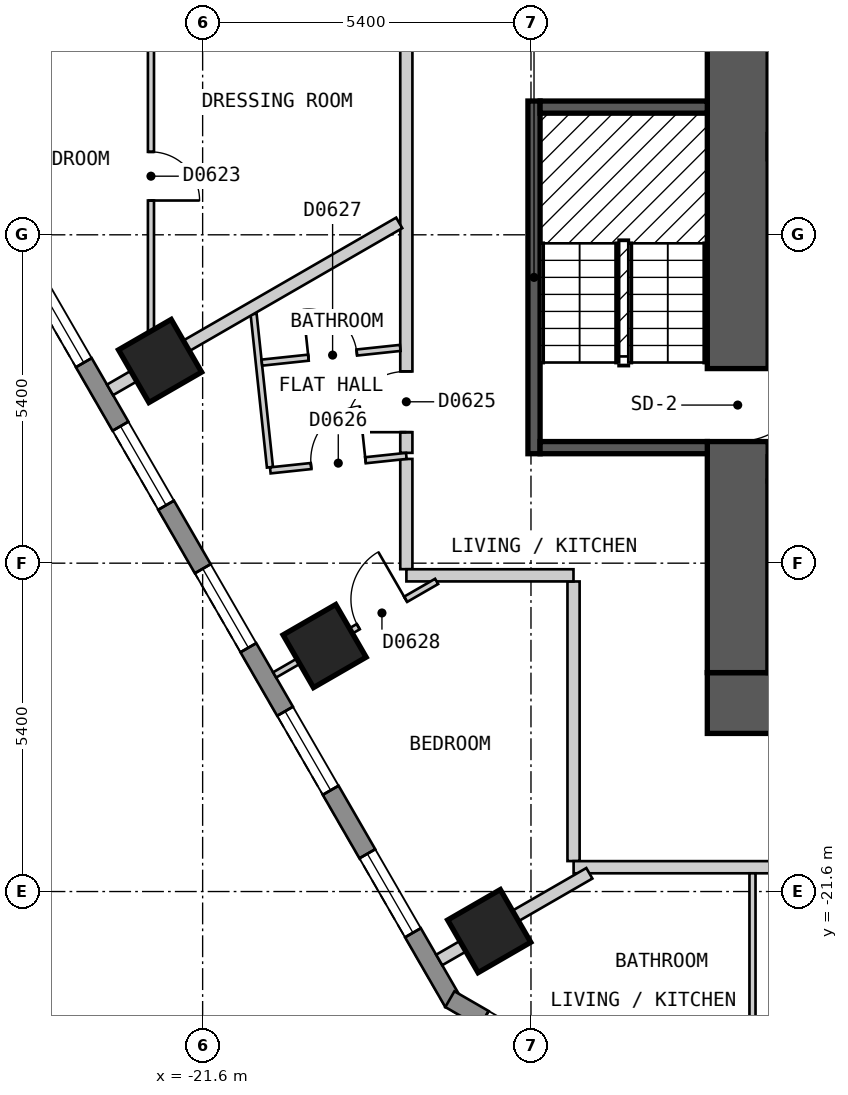
"""IFC4 building model, lengths in metres.
Left out: names, types, materials, properties, quantities, classifications, styles, units other than length and angle.
Written with IfcOpenShell. Run it as: python <this file> out.ifc"""

import sys

from ifc_helpers import new_model, si_unit, direction, frame, frame_2d, origin, origin_2d, place, context, subcontext, project, spatial, polyline, rectangle, outline, extrude, element, fill, save


model = new_model("IFC4")
c1 = context("Model", 3, precision=1e-05, world=origin(), true_north=direction((0.0, 1.0)))
c2 = subcontext(c1, "Body", "Model", "MODEL_VIEW")
j1 = project(units=[si_unit("LENGTHUNIT", "METRE"), si_unit("PLANEANGLEUNIT", "RADIAN")], contexts=[c1])
p1 = place(None, origin())
s1 = spatial("IfcSite", under=j1, at=p1, CompositionType="ELEMENT")
p2 = place(p1, origin())
s2 = spatial("IfcBuilding", under=s1, at=p2, CompositionType="ELEMENT")
p3 = place(p2, frame((0.0, 0.0, 81.0)))
s3 = spatial("IfcBuildingStorey", under=s2, at=p3, CompositionType="ELEMENT", Elevation=81.0)
for number, where, z_axis, x_axis in (
    (1, (-22.3, -12.875, 0.0), (0.0, 0.0, 1.0), (0.5, -0.866, 0.0)),
    (2, (-19.594, -17.563, 0.0), (0.0, 0.0, 1.0), (0.5, -0.866, 0.0)),
    (3, (-16.887, -22.251, 0.0), (0.0, 0.0, 1.0), (0.5, -0.866, 0.0)),
):
    element("IfcColumn", number, at=place(p3, frame(where, z_axis=z_axis, x_axis=x_axis)), inside=s3, PredefinedType="COLUMN", context=c2, shape_type="SweptSolid", body=[
        extrude(rectangle(XDim=1.0, YDim=1.0, at=origin_2d()), origin(), (0.0, 0.0, 1.0), 3.0),
    ])
p4 = place(p3, frame((-13.3, -18.5, 0.0), z_axis=(0.0, 0.0, 1.0), x_axis=(1.0, 0.0, 0.0)))
e4 = element("IfcWall", 4, at=p4, inside=s3, PredefinedType="SHEAR", context=c2, shape_type="SweptSolid", body=[
    extrude(rectangle(XDim=26.6, YDim=1.0, at=frame_2d((13.3, 0.0))), origin(), (0.0, 0.0, 1.0), 2.7),
])
p5 = place(p3, frame((-12.8, -18.0, 0.0), z_axis=(0.0, 0.0, 1.0), x_axis=(0.0, 1.0, 0.0)))
e5 = element("IfcWall", 5, at=p5, inside=s3, PredefinedType="SHEAR", context=c2, shape_type="SweptSolid", body=[
    extrude(rectangle(XDim=12.0, YDim=1.0, at=frame_2d((6.0, 0.0))), origin(), (0.0, 0.0, 1.0), 2.7),
])
p6 = place(p5, frame((3.8, 0.0, 0.0)))
e6 = element("IfcOpeningElement", 6, at=p6, cuts=e5, PredefinedType="OPENING", context=c2, shape_type="SweptSolid", body=[
    extrude(rectangle(XDim=1.2, YDim=2.1, at=frame_2d((0.6, 1.05))), frame((0.0, 0.51, 0.0), z_axis=(0.0, -1.0, 0.0), x_axis=(1.0, 0.0, 0.0)), (0.0, 0.0, 1.0), 1.02),
])
p7 = place(p3, frame((-29.027, -3.425, 0.0), z_axis=(0.0, 0.0, 1.0), x_axis=(0.500035407905, -0.866004960056, 0.0)))
e7 = element("IfcWall", 7, at=p7, inside=s3, PredefinedType="SOLIDWALL", context=c2, shape_type="SweptSolid", body=[
    extrude(outline(polyline([(0.0, -0.15), (23.094, -0.15), (23.014, 0.15), (0.08, 0.15), (0.0, -0.15)])), origin(), (0.0, 0.0, 1.0), 2.7),
])
p8 = place(p7, frame((1.324, 0.0, 0.15)))
e8 = element("IfcOpeningElement", 8, at=p8, cuts=e7, PredefinedType="OPENING", context=c2, shape_type="SweptSolid", body=[
    extrude(rectangle(XDim=1.5, YDim=2.1, at=frame_2d((0.75, 1.05))), frame((0.0, 0.16, 0.0), z_axis=(0.0, -1.0, 0.0), x_axis=(1.0, 0.0, 0.0)), (0.0, 0.0, 1.0), 0.32),
])
p9 = place(p7, frame((4.031, 0.0, 0.15)))
e9 = element("IfcOpeningElement", 9, at=p9, cuts=e7, PredefinedType="OPENING", context=c2, shape_type="SweptSolid", body=[
    extrude(rectangle(XDim=1.5, YDim=2.1, at=frame_2d((0.75, 1.05))), frame((0.0, 0.16, 0.0), z_axis=(0.0, -1.0, 0.0), x_axis=(1.0, 0.0, 0.0)), (0.0, 0.0, 1.0), 0.32),
])
p10 = place(p7, frame((6.737, 0.0, 0.15)))
e10 = element("IfcOpeningElement", 10, at=p10, cuts=e7, PredefinedType="OPENING", context=c2, shape_type="SweptSolid", body=[
    extrude(rectangle(XDim=1.5, YDim=2.1, at=frame_2d((0.75, 1.05))), frame((0.0, 0.16, 0.0), z_axis=(0.0, -1.0, 0.0), x_axis=(1.0, 0.0, 0.0)), (0.0, 0.0, 1.0), 0.32),
])
p11 = place(p7, frame((9.444, 0.0, 0.15)))
e11 = element("IfcOpeningElement", 11, at=p11, cuts=e7, PredefinedType="OPENING", context=c2, shape_type="SweptSolid", body=[
    extrude(rectangle(XDim=1.5, YDim=2.1, at=frame_2d((0.75, 1.05))), frame((0.0, 0.16, 0.0), z_axis=(0.0, -1.0, 0.0), x_axis=(1.0, 0.0, 0.0)), (0.0, 0.0, 1.0), 0.32),
])
p12 = place(p7, frame((12.151, 0.0, 0.15)))
e12 = element("IfcOpeningElement", 12, at=p12, cuts=e7, PredefinedType="OPENING", context=c2, shape_type="SweptSolid", body=[
    extrude(rectangle(XDim=1.5, YDim=2.1, at=frame_2d((0.75, 1.05))), frame((0.0, 0.16, 0.0), z_axis=(0.0, -1.0, 0.0), x_axis=(1.0, 0.0, 0.0)), (0.0, 0.0, 1.0), 0.32),
])
p13 = place(p7, frame((14.857, 0.0, 0.15)))
e13 = element("IfcOpeningElement", 13, at=p13, cuts=e7, PredefinedType="OPENING", context=c2, shape_type="SweptSolid", body=[
    extrude(rectangle(XDim=1.5, YDim=2.1, at=frame_2d((0.75, 1.05))), frame((0.0, 0.16, 0.0), z_axis=(0.0, -1.0, 0.0), x_axis=(1.0, 0.0, 0.0)), (0.0, 0.0, 1.0), 0.32),
])
p14 = place(p7, frame((17.564, 0.0, 0.15)))
e14 = element("IfcOpeningElement", 14, at=p14, cuts=e7, PredefinedType="OPENING", context=c2, shape_type="SweptSolid", body=[
    extrude(rectangle(XDim=1.5, YDim=2.1, at=frame_2d((0.75, 1.05))), frame((0.0, 0.16, 0.0), z_axis=(0.0, -1.0, 0.0), x_axis=(1.0, 0.0, 0.0)), (0.0, 0.0, 1.0), 0.32),
])
p15 = place(p7, frame((20.27, 0.0, 0.15)))
e15 = element("IfcOpeningElement", 15, at=p15, cuts=e7, PredefinedType="OPENING", context=c2, shape_type="SweptSolid", body=[
    extrude(rectangle(XDim=1.5, YDim=2.1, at=frame_2d((0.75, 1.05))), frame((0.0, 0.16, 0.0), z_axis=(0.0, -1.0, 0.0), x_axis=(1.0, 0.0, 0.0)), (0.0, 0.0, 1.0), 0.32),
])
p16 = place(p3, frame((-17.534, -23.37, 0.0), z_axis=(0.0, 0.0, 1.0), x_axis=(0.866010750942, -0.50002537861, 0.0)))
e16 = element("IfcWall", 16, at=p16, inside=s3, PredefinedType="SOLIDWALL", context=c2, shape_type="SweptSolid", body=[
    extrude(outline(polyline([(0.0, -0.15), (5.0, -0.15), (4.919, 0.15), (0.08, 0.15), (0.0, -0.15)])), origin(), (0.0, 0.0, 1.0), 2.7),
])
p17 = place(p16, frame((0.65, 0.0, 0.15)))
e17 = element("IfcOpeningElement", 17, at=p17, cuts=e16, PredefinedType="OPENING", context=c2, shape_type="SweptSolid", body=[
    extrude(rectangle(XDim=1.2, YDim=2.1, at=frame_2d((0.6, 1.05))), frame((0.0, 0.16, 0.0), z_axis=(0.0, -1.0, 0.0), x_axis=(1.0, 0.0, 0.0)), (0.0, 0.0, 1.0), 0.32),
])
p18 = place(p16, frame((3.15, 0.0, 0.15)))
e18 = element("IfcOpeningElement", 18, at=p18, cuts=e16, PredefinedType="OPENING", context=c2, shape_type="SweptSolid", body=[
    extrude(rectangle(XDim=1.2, YDim=2.1, at=frame_2d((0.6, 1.05))), frame((0.0, 0.16, 0.0), z_axis=(0.0, -1.0, 0.0), x_axis=(1.0, 0.0, 0.0)), (0.0, 0.0, 1.0), 0.32),
])
p19 = place(p3, frame((-15.5, -16.501, 0.0), z_axis=(0.0, 0.0, 1.0), x_axis=(0.0, -1.0, 0.0)))
e19 = element("IfcWall", 19, at=p19, inside=s3, PredefinedType="PARTITIONING", context=c2, shape_type="SweptSolid", body=[
    extrude(rectangle(XDim=4.598, YDim=0.2, at=frame_2d((2.299, 0.0))), origin(), (0.0, 0.0, 1.0), 2.7),
])
p20 = place(p3, frame((-18.25, -14.486, 0.0), z_axis=(0.0, 0.0, 1.0), x_axis=(0.0, -1.0, 0.0)))
e20 = element("IfcWall", 20, at=p20, inside=s3, PredefinedType="PARTITIONING", context=c2, shape_type="SweptSolid", body=[
    extrude(rectangle(XDim=1.813, YDim=0.2, at=frame_2d((0.906, 0.0))), origin(), (0.0, 0.0, 1.0), 2.7),
])
p21 = place(p3, frame((-18.249, -16.4, 0.0), z_axis=(0.0, 0.0, 1.0), x_axis=(1.0, 0.0, 0.0)))
e21 = element("IfcWall", 21, at=p21, inside=s3, PredefinedType="PARTITIONING", context=c2, shape_type="SweptSolid", body=[
    extrude(rectangle(XDim=2.748, YDim=0.2, at=frame_2d((1.374, 0.0))), origin(), (0.0, 0.0, 1.0), 2.7),
])
p22 = place(p3, frame((-15.499, -21.2, 0.0), z_axis=(0.0, 0.0, 1.0), x_axis=(1.0, 0.0, 0.0)))
e22 = element("IfcWall", 22, at=p22, inside=s3, PredefinedType="PARTITIONING", context=c2, shape_type="SweptSolid", body=[
    extrude(rectangle(XDim=30.898, YDim=0.2, at=frame_2d((15.449, 0.0))), origin(), (0.0, 0.0, 1.0), 2.7),
])
p23 = place(p22, frame((4.954, 0.0, 0.0)))
e23 = element("IfcOpeningElement", 23, at=p23, cuts=e22, PredefinedType="OPENING", context=c2, shape_type="SweptSolid", body=[
    extrude(rectangle(XDim=1.0, YDim=2.1, at=frame_2d((0.5, 1.05))), frame((0.0, 0.11, 0.0), z_axis=(0.0, -1.0, 0.0), x_axis=(1.0, 0.0, 0.0)), (0.0, 0.0, 1.0), 0.22),
])
p24 = place(p22, frame((25.046, 0.0, 0.0)))
e24 = element("IfcOpeningElement", 24, at=p24, cuts=e22, PredefinedType="OPENING", context=c2, shape_type="SweptSolid", body=[
    extrude(rectangle(XDim=1.0, YDim=2.1, at=frame_2d((0.5, 1.05))), frame((0.0, 0.11, 0.0), z_axis=(0.0, -1.0, 0.0), x_axis=(1.0, 0.0, 0.0)), (0.0, 0.0, 1.0), 0.22),
])
p25 = place(p3, frame((-18.25, -14.386, 0.0), z_axis=(0.0, 0.0, 1.0), x_axis=(0.0, 1.0, 0.0)))
e25 = element("IfcWall", 25, at=p25, inside=s3, PredefinedType="PARTITIONING", context=c2, shape_type="SweptSolid", body=[
    extrude(rectangle(XDim=7.786, YDim=0.2, at=frame_2d((3.893, 0.0))), origin(), (0.0, 0.0, 1.0), 2.7),
])
p26 = place(p25, frame((0.34, 0.0, 0.0)))
e26 = element("IfcOpeningElement", 26, at=p26, cuts=e25, PredefinedType="OPENING", context=c2, shape_type="SweptSolid", body=[
    extrude(rectangle(XDim=1.0, YDim=2.1, at=frame_2d((0.5, 1.05))), frame((0.0, 0.11, 0.0), z_axis=(0.0, -1.0, 0.0), x_axis=(1.0, 0.0, 0.0)), (0.0, 0.0, 1.0), 0.22),
])
p27 = place(p3, frame((-20.762, -12.102, 0.0), z_axis=(0.0, 0.0, 1.0), x_axis=(0.106118300401, -0.994353511745, 0.0)))
e27 = element("IfcWall", 27, at=p27, inside=s3, PredefinedType="PARTITIONING", context=c2, shape_type="SweptSolid", body=[
    extrude(rectangle(XDim=2.535, YDim=0.1, at=frame_2d((1.268, 0.0))), origin(), (0.0, 0.0, 1.0), 2.7),
])
p28 = place(p3, frame((-12.557, -21.3, 0.0), z_axis=(0.0, 0.0, 1.0), x_axis=(0.0, -1.0, 0.0)))
e28 = element("IfcWall", 28, at=p28, inside=s3, PredefinedType="PARTITIONING", context=c2, shape_type="SweptSolid", body=[
    extrude(rectangle(XDim=2.909, YDim=0.1, at=frame_2d((1.455, 0.0))), origin(), (0.0, 0.0, 1.0), 2.7),
])
p29 = place(p3, frame((-20.626, -12.902, 0.0), z_axis=(0.0, 0.0, 1.0), x_axis=(0.994385570266, 0.105817473257, 0.0)))
e29 = element("IfcWall", 29, at=p29, inside=s3, PredefinedType="PARTITIONING", context=c2, shape_type="SweptSolid", body=[
    extrude(rectangle(XDim=2.289, YDim=0.1, at=frame_2d((1.145, 0.0))), origin(), (0.0, 0.0, 1.0), 2.7),
])
p30 = place(p29, frame((0.77, 0.0, 0.0)))
e30 = element("IfcOpeningElement", 30, at=p30, cuts=e29, PredefinedType="OPENING", context=c2, shape_type="SweptSolid", body=[
    extrude(rectangle(XDim=0.8, YDim=2.1, at=frame_2d((0.4, 1.05))), frame((0.0, 0.06, 0.0), z_axis=(0.0, -1.0, 0.0), x_axis=(1.0, 0.0, 0.0)), (0.0, 0.0, 1.0), 0.12),
])
p31 = place(p3, frame((-20.487, -14.674, 0.0), z_axis=(0.0, 0.0, 1.0), x_axis=(0.994386484046, 0.105808885948, 0.0)))
e31 = element("IfcWall", 31, at=p31, inside=s3, PredefinedType="PARTITIONING", context=c2, shape_type="SweptSolid", body=[
    extrude(rectangle(XDim=2.25, YDim=0.1, at=frame_2d((1.125, 0.0))), origin(), (0.0, 0.0, 1.0), 2.7),
])
p32 = place(p31, frame((0.674, 0.0, 0.0)))
e32 = element("IfcOpeningElement", 32, at=p32, cuts=e31, PredefinedType="OPENING", context=c2, shape_type="SweptSolid", body=[
    extrude(rectangle(XDim=0.9, YDim=2.1, at=frame_2d((0.45, 1.05))), frame((0.0, 0.06, 0.0), z_axis=(0.0, -1.0, 0.0), x_axis=(1.0, 0.0, 0.0)), (0.0, 0.0, 1.0), 0.12),
])
p33 = place(p3, frame((-22.45, -12.846, 0.0), z_axis=(0.0, 0.0, 1.0), x_axis=(0.0, 1.0, 0.0)))
e33 = element("IfcWall", 33, at=p33, inside=s3, PredefinedType="PARTITIONING", context=c2, shape_type="SweptSolid", body=[
    extrude(rectangle(XDim=6.078, YDim=0.1, at=frame_2d((3.039, 0.0))), origin(), (0.0, 0.0, 1.0), 2.7),
])
p34 = place(p33, frame((2.61, 0.0, 0.0)))
e34 = element("IfcOpeningElement", 34, at=p34, cuts=e33, PredefinedType="OPENING", context=c2, shape_type="SweptSolid", body=[
    extrude(rectangle(XDim=0.8, YDim=2.1, at=frame_2d((0.4, 1.05))), frame((0.0, 0.06, 0.0), z_axis=(0.0, -1.0, 0.0), x_axis=(1.0, 0.0, 0.0)), (0.0, 0.0, 1.0), 0.12),
])
p35 = place(p3, frame((-20.416, -18.038, 0.0), z_axis=(0.0, 0.0, 1.0), x_axis=(0.866026989333, 0.499997253739, 0.0)))
e35 = element("IfcWall", 35, at=p35, inside=s3, PredefinedType="PARTITIONING", context=c2, shape_type="SweptSolid", body=[
    extrude(rectangle(XDim=3.076, YDim=0.1, at=frame_2d((1.538, 0.0))), origin(), (0.0, 0.0, 1.0), 2.7),
])
p36 = place(p35, frame((1.588, 0.0, 0.0)))
e36 = element("IfcOpeningElement", 36, at=p36, cuts=e35, PredefinedType="OPENING", context=c2, shape_type="SweptSolid", body=[
    extrude(rectangle(XDim=0.9, YDim=2.1, at=frame_2d((0.45, 1.05))), frame((0.0, 0.06, 0.0), z_axis=(0.0, -1.0, 0.0), x_axis=(1.0, 0.0, 0.0)), (0.0, 0.0, 1.0), 0.12),
])
p37 = place(p3, frame((-25.83, -8.662, 0.0), z_axis=(0.0, 0.0, 1.0), x_axis=(0.866022959057, 0.500004234368, 0.0)))
e37 = element("IfcWall", 37, at=p37, inside=s3, PredefinedType="PARTITIONING", context=c2, shape_type="SweptSolid", body=[
    extrude(rectangle(XDim=10.0, YDim=0.1, at=frame_2d((5.0, 0.0))), origin(), (0.0, 0.0, 1.0), 2.7),
])
p38 = place(p37, frame((1.501, 0.0, 0.0)))
e38 = element("IfcOpeningElement", 38, at=p38, cuts=e37, PredefinedType="OPENING", context=c2, shape_type="SweptSolid", body=[
    extrude(rectangle(XDim=0.9, YDim=2.1, at=frame_2d((0.45, 1.05))), frame((0.0, 0.06, 0.0), z_axis=(0.0, -1.0, 0.0), x_axis=(1.0, 0.0, 0.0)), (0.0, 0.0, 1.0), 0.12),
])
p39 = place(p3, frame((-17.709, -22.725, 0.0), z_axis=(0.0, 0.0, 1.0), x_axis=(0.866090043625, 0.499888023795, 0.0)))
e39 = element("IfcWall", 39, at=p39, inside=s3, PredefinedType="PARTITIONING", context=c2, shape_type="SweptSolid", body=[
    extrude(rectangle(XDim=2.851, YDim=0.2, at=frame_2d((1.425, 0.0))), origin(), (0.0, 0.0, 1.0), 2.7),
])
p40 = place(p3, frame((-23.123, -13.35, 0.0), z_axis=(0.0, 0.0, 1.0), x_axis=(0.866013095437, 0.500021318078, 0.0)))
e40 = element("IfcWall", 40, at=p40, inside=s3, PredefinedType="PARTITIONING", context=c2, shape_type="SweptSolid", body=[
    extrude(rectangle(XDim=5.492, YDim=0.2, at=frame_2d((2.746, 0.0))), origin(), (0.0, 0.0, 1.0), 2.7),
])
p41 = place(p3, frame((-16.15, -14.4, 0.0), z_axis=(0.0, 0.0, 1.0), x_axis=(0.0, 1.0, 0.0)))
e41 = element("IfcWall", 41, at=p41, inside=s3, PredefinedType="SOLIDWALL", context=c2, shape_type="SweptSolid", body=[
    extrude(rectangle(XDim=5.8, YDim=0.2, at=frame_2d((2.9, 0.0))), origin(), (0.0, 0.0, 1.0), 2.7),
])
for number, where, z_axis, x_axis in (
    (42, (-16.05, -14.3, 0.0), (0.0, 0.0, 1.0), (1.0, 0.0, 0.0)),
    (43, (-16.05, -8.7, 0.0), (0.0, 0.0, 1.0), (1.0, 0.0, 0.0)),
):
    element("IfcWall", number, at=place(p3, frame(where, z_axis=z_axis, x_axis=x_axis)), inside=s3, PredefinedType="SOLIDWALL", context=c2, shape_type="SweptSolid", body=[
        extrude(rectangle(XDim=2.75, YDim=0.2, at=frame_2d((1.375, 0.0))), origin(), (0.0, 0.0, 1.0), 2.7),
    ])
p42 = place(p11, origin())
e44 = element("IfcWindow", 44, at=p42, inside=s3, PartitioningType="SINGLE_PANEL", PredefinedType="WINDOW", context=c2, shape_type="SweptSolid", body=[
    extrude(rectangle(XDim=1.5, YDim=2.1, at=frame_2d((0.75, 1.05))), frame((0.0, 0.03, 0.0), z_axis=(0.0, -1.0, 0.0), x_axis=(1.0, 0.0, 0.0)), (0.0, 0.0, 1.0), 0.06),
])
fill(e11, e44)
p43 = place(p12, origin())
e45 = element("IfcWindow", 45, at=p43, inside=s3, PartitioningType="SINGLE_PANEL", PredefinedType="WINDOW", context=c2, shape_type="SweptSolid", body=[
    extrude(rectangle(XDim=1.5, YDim=2.1, at=frame_2d((0.75, 1.05))), frame((0.0, 0.03, 0.0), z_axis=(0.0, -1.0, 0.0), x_axis=(1.0, 0.0, 0.0)), (0.0, 0.0, 1.0), 0.06),
])
fill(e12, e45)
p44 = place(p13, origin())
e46 = element("IfcWindow", 46, at=p44, inside=s3, PartitioningType="SINGLE_PANEL", PredefinedType="WINDOW", context=c2, shape_type="SweptSolid", body=[
    extrude(rectangle(XDim=1.5, YDim=2.1, at=frame_2d((0.75, 1.05))), frame((0.0, 0.03, 0.0), z_axis=(0.0, -1.0, 0.0), x_axis=(1.0, 0.0, 0.0)), (0.0, 0.0, 1.0), 0.06),
])
fill(e13, e46)
p45 = place(p14, origin())
e47 = element("IfcWindow", 47, at=p45, inside=s3, PartitioningType="SINGLE_PANEL", PredefinedType="WINDOW", context=c2, shape_type="SweptSolid", body=[
    extrude(rectangle(XDim=1.5, YDim=2.1, at=frame_2d((0.75, 1.05))), frame((0.0, 0.03, 0.0), z_axis=(0.0, -1.0, 0.0), x_axis=(1.0, 0.0, 0.0)), (0.0, 0.0, 1.0), 0.06),
])
fill(e14, e47)
p46 = place(p15, origin())
e48 = element("IfcWindow", 48, at=p46, inside=s3, PartitioningType="SINGLE_PANEL", PredefinedType="WINDOW", context=c2, shape_type="SweptSolid", body=[
    extrude(rectangle(XDim=1.5, YDim=2.1, at=frame_2d((0.75, 1.05))), frame((0.0, 0.03, 0.0), z_axis=(0.0, -1.0, 0.0), x_axis=(1.0, 0.0, 0.0)), (0.0, 0.0, 1.0), 0.06),
])
fill(e15, e48)
p47 = place(p38, origin())
e49 = element("IfcDoor", 49, at=p47, inside=s3, OperationType="SINGLE_SWING_RIGHT", PredefinedType="DOOR", context=c2, shape_type="SweptSolid", body=[
    extrude(rectangle(XDim=0.9, YDim=2.1, at=frame_2d((0.45, 1.05))), frame((0.0, 0.025, 0.0), z_axis=(0.0, -1.0, 0.0), x_axis=(1.0, 0.0, 0.0)), (0.0, 0.0, 1.0), 0.05),
])
fill(e38, e49)
p48 = place(p34, origin())
e50 = element("IfcDoor", 50, at=p48, inside=s3, OperationType="SINGLE_SWING_LEFT", PredefinedType="DOOR", context=c2, shape_type="SweptSolid", body=[
    extrude(rectangle(XDim=0.8, YDim=2.1, at=frame_2d((0.4, 1.05))), frame((0.0, 0.025, 0.0), z_axis=(0.0, -1.0, 0.0), x_axis=(1.0, 0.0, 0.0)), (0.0, 0.0, 1.0), 0.05),
])
fill(e34, e50)
p49 = place(p26, origin())
e51 = element("IfcDoor", 51, at=p49, inside=s3, OperationType="SINGLE_SWING_LEFT", PredefinedType="DOOR", context=c2, shape_type="SweptSolid", body=[
    extrude(rectangle(XDim=1.0, YDim=2.1, at=frame_2d((0.5, 1.05))), frame((0.0, 0.025, 0.0), z_axis=(0.0, -1.0, 0.0), x_axis=(1.0, 0.0, 0.0)), (0.0, 0.0, 1.0), 0.05),
])
fill(e26, e51)
p50 = place(p32, origin())
e52 = element("IfcDoor", 52, at=p50, inside=s3, OperationType="SINGLE_SWING_RIGHT", PredefinedType="DOOR", context=c2, shape_type="SweptSolid", body=[
    extrude(rectangle(XDim=0.9, YDim=2.1, at=frame_2d((0.45, 1.05))), frame((0.0, 0.025, 0.0), z_axis=(0.0, -1.0, 0.0), x_axis=(1.0, 0.0, 0.0)), (0.0, 0.0, 1.0), 0.05),
])
fill(e32, e52)
p51 = place(p30, origin())
e53 = element("IfcDoor", 53, at=p51, inside=s3, OperationType="SINGLE_SWING_LEFT", PredefinedType="DOOR", context=c2, shape_type="SweptSolid", body=[
    extrude(rectangle(XDim=0.8, YDim=2.1, at=frame_2d((0.4, 1.05))), frame((0.0, 0.025, 0.0), z_axis=(0.0, -1.0, 0.0), x_axis=(1.0, 0.0, 0.0)), (0.0, 0.0, 1.0), 0.05),
])
fill(e30, e53)
p52 = place(p36, origin())
e54 = element("IfcDoor", 54, at=p52, inside=s3, OperationType="SINGLE_SWING_RIGHT", PredefinedType="DOOR", context=c2, shape_type="SweptSolid", body=[
    extrude(rectangle(XDim=0.9, YDim=2.1, at=frame_2d((0.45, 1.05))), frame((0.0, 0.025, 0.0), z_axis=(0.0, -1.0, 0.0), x_axis=(1.0, 0.0, 0.0)), (0.0, 0.0, 1.0), 0.05),
])
fill(e36, e54)
p53 = place(p6, origin())
e55 = element("IfcDoor", 55, at=p53, inside=s3, OperationType="SINGLE_SWING_RIGHT", PredefinedType="DOOR", context=c2, shape_type="SweptSolid", body=[
    extrude(rectangle(XDim=1.2, YDim=2.1, at=frame_2d((0.6, 1.05))), frame((0.0, 0.025, 0.0), z_axis=(0.0, -1.0, 0.0), x_axis=(1.0, 0.0, 0.0)), (0.0, 0.0, 1.0), 0.05),
])
fill(e6, e55)
save(model, sys.argv[1])
